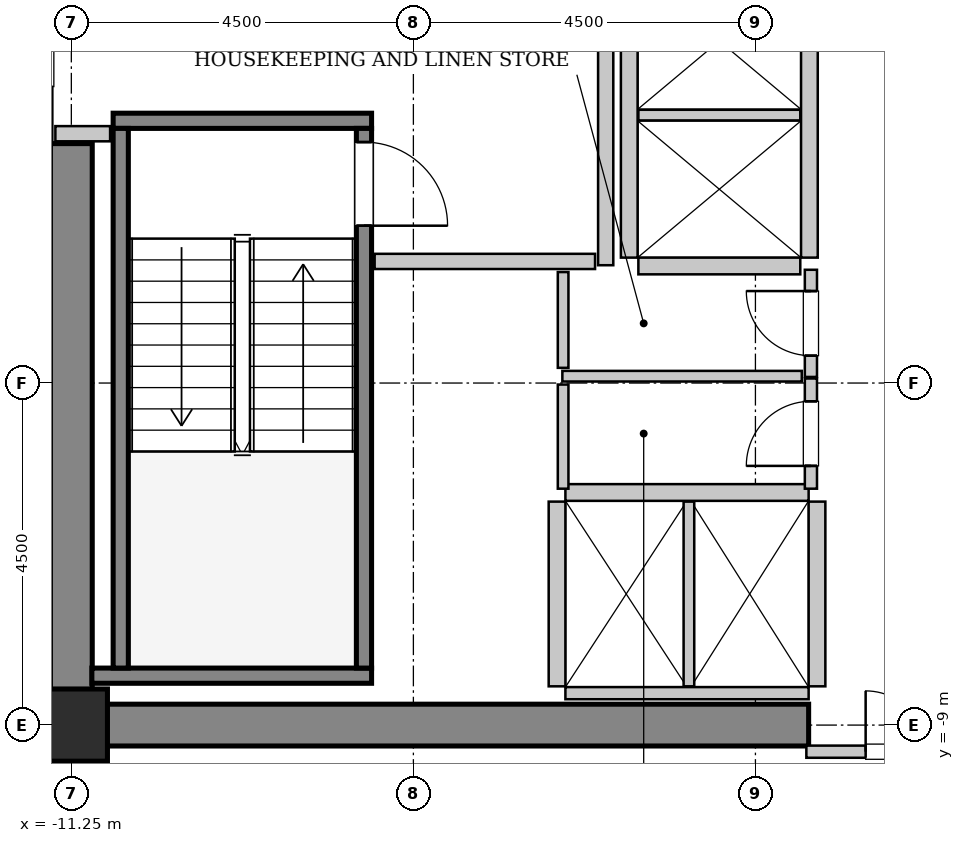
"""IFC4 building model, lengths in metres.
Left out: names, types, materials, properties, quantities, classifications, styles, units other than length and angle.
Written with IfcOpenShell. Run it as: python <this file> out.ifc"""

import sys

from ifc_helpers import new_model, si_unit, direction, frame, frame_2d, origin, origin_2d, place, context, subcontext, project, spatial, rectangle, hollow_rectangle, extrude, source, transform, mapped, element, fill, save


model = new_model("IFC4")
c1 = context("Model", 3, precision=1e-05, world=origin(), true_north=direction((0.0, 1.0)))
c2 = subcontext(c1, "Body", "Model", "MODEL_VIEW")
j1 = project(units=[si_unit("LENGTHUNIT", "METRE"), si_unit("PLANEANGLEUNIT", "RADIAN")], contexts=[c1])
p1 = place(None, origin())
s1 = spatial("IfcSite", under=j1, at=p1, CompositionType="ELEMENT")
p2 = place(p1, origin())
s2 = spatial("IfcBuilding", under=s1, at=p2, CompositionType="ELEMENT")
p3 = place(p2, frame((0.0, 0.0, 140.2)))
s3 = spatial("IfcBuildingStorey", under=s2, at=p3, CompositionType="ELEMENT", Elevation=140.2)
m1 = source(origin(), c2, "Body", "SweptSolid", [
    extrude(rectangle(XDim=9.975, YDim=0.55, at=frame_2d((4.987, 0.0))), origin(), (0.0, 0.0, 1.0), 3.8),
])
p4 = place(p3, frame((-11.525, -9.0, 0.0), z_axis=(0.0, 0.0, 1.0), x_axis=(1.0, 0.0, 0.0)))
e1 = element("IfcWall", 1, at=p4, inside=s3, PredefinedType="SHEAR", context=c2, shape_type="MappedRepresentation", body=[
    mapped(m1, transform((0.0, 0.0, 0.0), x_axis=(1.0, 0.0, 0.0), y_axis=(0.0, 1.0, 0.0), z_axis=(0.0, 0.0, 1.0), scale=1.0)),
])
m2 = source(origin(), c2, "Body", "SweptSolid", [
    extrude(rectangle(XDim=7.375, YDim=0.55, at=frame_2d((3.688, 0.0))), origin(), (0.0, 0.0, 1.0), 3.8),
])
p5 = place(p3, frame((-11.25, -8.725, 0.0), z_axis=(0.0, 0.0, 1.0), x_axis=(0.0, 1.0, 0.0)))
e2 = element("IfcWall", 2, at=p5, inside=s3, PredefinedType="SHEAR", context=c2, shape_type="MappedRepresentation", body=[
    mapped(m2, transform((0.0, 0.0, 0.0), x_axis=(1.0, 0.0, 0.0), y_axis=(0.0, 1.0, 0.0), z_axis=(0.0, 0.0, 1.0), scale=1.0)),
])
m3 = source(origin(), c2, "Body", "SweptSolid", [
    extrude(hollow_rectangle(XDim=0.95, YDim=0.95, WallThickness=0.045, InnerFilletRadius=0.045, OuterFilletRadius=0.09, at=origin_2d()), origin(), (0.0, 0.0, 1.0), 3.8),
])
p6 = place(p3, frame((-11.25, -9.0, 0.0), z_axis=(0.0, 0.0, 1.0), x_axis=(1.0, 0.0, 0.0)))
e3 = element("IfcColumn", 3, at=p6, inside=s3, PredefinedType="COLUMN", context=c2, shape_type="MappedRepresentation", body=[
    mapped(m3, transform((0.0, 0.0, 0.0), x_axis=(1.0, 0.0, 0.0), y_axis=(0.0, 1.0, 0.0), z_axis=(0.0, 0.0, 1.0), scale=1.0)),
])
m4 = source(origin(), c2, "Body", "SweptSolid", [
    extrude(rectangle(XDim=3.4, YDim=0.2, at=frame_2d((1.7, 0.0))), origin(), (0.0, 0.0, 1.0), 3.8),
])
p7 = place(p3, frame((-10.7, -1.05, 0.0), z_axis=(0.0, 0.0, 1.0), x_axis=(1.0, 0.0, 0.0)))
e4 = element("IfcWall", 4, at=p7, inside=s3, PredefinedType="SOLIDWALL", context=c2, shape_type="MappedRepresentation", body=[
    mapped(m4, transform((0.0, 0.0, 0.0), x_axis=(1.0, 0.0, 0.0), y_axis=(0.0, 1.0, 0.0), z_axis=(0.0, 0.0, 1.0), scale=1.0)),
])
m5 = source(origin(), c2, "Body", "SweptSolid", [
    extrude(rectangle(XDim=3.68, YDim=0.2, at=frame_2d((1.84, 0.0))), origin(), (0.0, 0.0, 1.0), 3.8),
])
p8 = place(p3, frame((-10.98, -8.35, 0.0), z_axis=(0.0, 0.0, 1.0), x_axis=(1.0, 0.0, 0.0)))
e5 = element("IfcWall", 5, at=p8, inside=s3, PredefinedType="SOLIDWALL", context=c2, shape_type="MappedRepresentation", body=[
    mapped(m5, transform((0.0, 0.0, 0.0), x_axis=(1.0, 0.0, 0.0), y_axis=(0.0, 1.0, 0.0), z_axis=(0.0, 0.0, 1.0), scale=1.0)),
])
m6 = source(origin(), c2, "Body", "SweptSolid", [
    extrude(rectangle(XDim=7.1, YDim=0.2, at=frame_2d((3.55, 0.0))), origin(), (0.0, 0.0, 1.0), 3.8),
])
p9 = place(p3, frame((-10.6, -1.15, 0.0), z_axis=(0.0, 0.0, 1.0), x_axis=(0.0, -1.0, 0.0)))
e6 = element("IfcWall", 6, at=p9, inside=s3, PredefinedType="SOLIDWALL", context=c2, shape_type="MappedRepresentation", body=[
    mapped(m6, transform((0.0, 0.0, 0.0), x_axis=(1.0, 0.0, 0.0), y_axis=(0.0, 1.0, 0.0), z_axis=(0.0, 0.0, 1.0), scale=1.0)),
])
p10 = place(p3, frame((-7.4, -1.15, 0.0), z_axis=(0.0, 0.0, 1.0), x_axis=(0.0, -1.0, 0.0)))
e7 = element("IfcWall", 7, at=p10, inside=s3, PredefinedType="SOLIDWALL", context=c2, shape_type="MappedRepresentation", body=[
    mapped(m6, transform((0.0, 0.0, 0.0), x_axis=(1.0, 0.0, 0.0), y_axis=(0.0, 1.0, 0.0), z_axis=(0.0, 0.0, 1.0), scale=1.0)),
])
p11 = place(p10, frame((0.18, 0.0, 0.0)))
e8 = element("IfcOpeningElement", 8, at=p11, cuts=e7, PredefinedType="OPENING", context=c2, shape_type="SweptSolid", body=[
    extrude(rectangle(XDim=1.1, YDim=2.15, at=frame_2d((0.55, 1.075))), frame((0.0, 0.11, 0.0), z_axis=(0.0, -1.0, 0.0), x_axis=(1.0, 0.0, 0.0)), (0.0, 0.0, 1.0), 0.22),
])
m7 = source(origin(), c2, "Body", "SweptSolid", [
    extrude(rectangle(XDim=3.2, YDim=0.22, at=frame_2d((1.6, 0.0))), origin(), (0.0, 0.0, 1.0), 3.485),
])
p12 = place(p3, frame((-1.55, -5.94, 0.0), z_axis=(0.0, 0.0, 1.0), x_axis=(-1.0, 0.0, 0.0)))
e9 = element("IfcWall", 9, at=p12, inside=s3, PredefinedType="SOLIDWALL", context=c2, shape_type="MappedRepresentation", body=[
    mapped(m7, transform((0.0, 0.0, 0.0), x_axis=(1.0, 0.0, 0.0), y_axis=(0.0, 1.0, 0.0), z_axis=(0.0, 0.0, 1.0), scale=1.0)),
])
m8 = source(origin(), c2, "Body", "SweptSolid", [
    extrude(rectangle(XDim=3.2, YDim=0.16, at=frame_2d((1.6, 0.0))), origin(), (0.0, 0.0, 1.0), 2.375),
])
p13 = place(p3, frame((-4.75, -8.58, 0.0), z_axis=(0.0, 0.0, 1.0), x_axis=(1.0, 0.0, 0.0)))
e10 = element("IfcWall", 10, at=p13, inside=s3, PredefinedType="PARTITIONING", context=c2, shape_type="MappedRepresentation", body=[
    mapped(m8, transform((0.0, 0.0, 0.0), x_axis=(1.0, 0.0, 0.0), y_axis=(0.0, 1.0, 0.0), z_axis=(0.0, 0.0, 1.0), scale=1.0)),
])
m9 = source(origin(), c2, "Body", "SweptSolid", [
    extrude(rectangle(XDim=2.43, YDim=0.22, at=frame_2d((1.215, 0.0))), origin(), (0.0, 0.0, 1.0), 3.485),
])
p14 = place(p3, frame((-4.86, -6.06, 0.0), z_axis=(0.0, 0.0, 1.0), x_axis=(0.0, -1.0, 0.0)))
e11 = element("IfcWall", 11, at=p14, inside=s3, PredefinedType="SOLIDWALL", context=c2, shape_type="MappedRepresentation", body=[
    mapped(m9, transform((0.0, 0.0, 0.0), x_axis=(1.0, 0.0, 0.0), y_axis=(0.0, 1.0, 0.0), z_axis=(0.0, 0.0, 1.0), scale=1.0)),
])
m10 = source(origin(), c2, "Body", "SweptSolid", [
    extrude(rectangle(XDim=2.43, YDim=0.14, at=frame_2d((1.215, 0.0))), origin(), (0.0, 0.0, 1.0), 3.485),
])
p15 = place(p3, frame((-3.125, -8.49, 0.0), z_axis=(0.0, 0.0, 1.0), x_axis=(0.0, 1.0, 0.0)))
e12 = element("IfcWall", 12, at=p15, inside=s3, PredefinedType="PARTITIONING", context=c2, shape_type="MappedRepresentation", body=[
    mapped(m10, transform((0.0, 0.0, 0.0), x_axis=(1.0, 0.0, 0.0), y_axis=(0.0, 1.0, 0.0), z_axis=(0.0, 0.0, 1.0), scale=1.0)),
])
p16 = place(p3, frame((-1.44, -8.49, 0.0), z_axis=(0.0, 0.0, 1.0), x_axis=(0.0, 1.0, 0.0)))
e13 = element("IfcWall", 13, at=p16, inside=s3, PredefinedType="SOLIDWALL", context=c2, shape_type="MappedRepresentation", body=[
    mapped(m9, transform((0.0, 0.0, 0.0), x_axis=(1.0, 0.0, 0.0), y_axis=(0.0, 1.0, 0.0), z_axis=(0.0, 0.0, 1.0), scale=1.0)),
])
m11 = source(origin(), c2, "Body", "SweptSolid", [
    extrude(rectangle(XDim=5.7, YDim=0.22, at=frame_2d((2.85, 0.0))), origin(), (0.0, 0.0, 1.0), 3.485),
])
for number, where, z_axis, x_axis in (
    (14, (-1.54, -2.85, 0.0), (0.0, 0.0, 1.0), (0.0, 1.0, 0.0)),
    (15, (-3.91, 2.85, 0.0), (0.0, 0.0, 1.0), (0.0, -1.0, 0.0)),
):
    element("IfcWall", number, at=place(p3, frame(where, z_axis=z_axis, x_axis=x_axis)), inside=s3, PredefinedType="SOLIDWALL", context=c2, shape_type="MappedRepresentation", body=[
        mapped(m11, transform((0.0, 0.0, 0.0), x_axis=(1.0, 0.0, 0.0), y_axis=(0.0, 1.0, 0.0), z_axis=(0.0, 0.0, 1.0), scale=1.0)),
    ])
m12 = source(origin(), c2, "Body", "SweptSolid", [
    extrude(rectangle(XDim=2.13, YDim=0.22, at=frame_2d((1.065, 0.0))), origin(), (0.0, 0.0, 1.0), 3.485),
])
p17 = place(p3, frame((-3.79, -2.96, 0.0), z_axis=(0.0, 0.0, 1.0), x_axis=(1.0, 0.0, 0.0)))
e16 = element("IfcWall", 16, at=p17, inside=s3, PredefinedType="SOLIDWALL", context=c2, shape_type="MappedRepresentation", body=[
    mapped(m12, transform((0.0, 0.0, 0.0), x_axis=(1.0, 0.0, 0.0), y_axis=(0.0, 1.0, 0.0), z_axis=(0.0, 0.0, 1.0), scale=1.0)),
])
m13 = source(origin(), c2, "Body", "SweptSolid", [
    extrude(rectangle(XDim=2.13, YDim=0.14, at=frame_2d((1.065, 0.0))), origin(), (0.0, 0.0, 1.0), 3.485),
])
p18 = place(p3, frame((-3.79, -0.975, 0.0), z_axis=(0.0, 0.0, 1.0), x_axis=(1.0, 0.0, 0.0)))
e17 = element("IfcWall", 17, at=p18, inside=s3, PredefinedType="PARTITIONING", context=c2, shape_type="MappedRepresentation", body=[
    mapped(m13, transform((0.0, 0.0, 0.0), x_axis=(1.0, 0.0, 0.0), y_axis=(0.0, 1.0, 0.0), z_axis=(0.0, 0.0, 1.0), scale=1.0)),
])
m14 = source(origin(), c2, "Body", "SweptSolid", [
    extrude(rectangle(XDim=5.9, YDim=0.2, at=frame_2d((2.95, 0.0))), origin(), (0.0, 0.0, 1.0), 3.485),
])
p19 = place(p3, frame((-4.22, -2.95, 0.0), z_axis=(0.0, 0.0, 1.0), x_axis=(0.0, 1.0, 0.0)))
e18 = element("IfcWall", 18, at=p19, inside=s3, PredefinedType="PARTITIONING", context=c2, shape_type="MappedRepresentation", body=[
    mapped(m14, transform((0.0, 0.0, 0.0), x_axis=(1.0, 0.0, 0.0), y_axis=(0.0, 1.0, 0.0), z_axis=(0.0, 0.0, 1.0), scale=1.0)),
])
m15 = source(origin(), c2, "Body", "SweptSolid", [
    extrude(rectangle(XDim=2.9, YDim=0.2, at=frame_2d((1.45, 0.0))), origin(), (0.0, 0.0, 1.0), 3.485),
])
p20 = place(p3, frame((-7.26, -2.9, 0.0), z_axis=(0.0, 0.0, 1.0), x_axis=(1.0, 0.0, 0.0)))
e19 = element("IfcWall", 19, at=p20, inside=s3, PredefinedType="PARTITIONING", context=c2, shape_type="MappedRepresentation", body=[
    mapped(m15, transform((0.0, 0.0, 0.0), x_axis=(1.0, 0.0, 0.0), y_axis=(0.0, 1.0, 0.0), z_axis=(0.0, 0.0, 1.0), scale=1.0)),
])
m16 = source(origin(), c2, "Body", "SweptSolid", [
    extrude(rectangle(XDim=0.72, YDim=0.2, at=frame_2d((0.36, 0.0))), origin(), (0.0, 0.0, 1.0), 3.485),
])
p21 = place(p3, frame((-11.46, -1.22, 0.0), z_axis=(0.0, 0.0, 1.0), x_axis=(1.0, 0.0, 0.0)))
e20 = element("IfcWall", 20, at=p21, inside=s3, PredefinedType="PARTITIONING", context=c2, shape_type="MappedRepresentation", body=[
    mapped(m16, transform((0.0, 0.0, 0.0), x_axis=(1.0, 0.0, 0.0), y_axis=(0.0, 1.0, 0.0), z_axis=(0.0, 0.0, 1.0), scale=1.0)),
])
m17 = source(origin(), c2, "Body", "SweptSolid", [
    extrude(rectangle(XDim=3.16, YDim=0.16, at=frame_2d((1.58, 0.0))), origin(), (0.0, 0.0, 1.0), 2.375),
])
p22 = place(p3, frame((-1.58, -9.35, 0.0), z_axis=(0.0, 0.0, 1.0), x_axis=(1.0, 0.0, 0.0)))
e21 = element("IfcWall", 21, at=p22, inside=s3, PredefinedType="PARTITIONING", context=c2, shape_type="MappedRepresentation", body=[
    mapped(m17, transform((0.0, 0.0, 0.0), x_axis=(1.0, 0.0, 0.0), y_axis=(0.0, 1.0, 0.0), z_axis=(0.0, 0.0, 1.0), scale=1.0)),
])
p23 = place(p22, frame((0.78, 0.0, 0.0)))
e22 = element("IfcOpeningElement", 22, at=p23, cuts=e21, PredefinedType="OPENING", context=c2, shape_type="SweptSolid", body=[
    extrude(rectangle(XDim=1.6, YDim=2.3, at=frame_2d((0.8, 1.15))), frame((0.0, 0.09, 0.0), z_axis=(0.0, -1.0, 0.0), x_axis=(1.0, 0.0, 0.0)), (0.0, 0.0, 1.0), 0.18),
])
m18 = source(origin(), c2, "Body", "SweptSolid", [
    extrude(rectangle(XDim=1.41, YDim=0.16, at=frame_2d((0.705, 0.0))), origin(), (0.0, 0.0, 1.0), 3.485),
])
p24 = place(p3, frame((-1.52, -4.42, 0.0), z_axis=(0.0, 0.0, 1.0), x_axis=(0.0, 1.0, 0.0)))
e23 = element("IfcWall", 23, at=p24, inside=s3, PredefinedType="PARTITIONING", context=c2, shape_type="MappedRepresentation", body=[
    mapped(m18, transform((0.0, 0.0, 0.0), x_axis=(1.0, 0.0, 0.0), y_axis=(0.0, 1.0, 0.0), z_axis=(0.0, 0.0, 1.0), scale=1.0)),
])
p25 = place(p24, frame((0.28, 0.0, 0.0)))
e24 = element("IfcOpeningElement", 24, at=p25, cuts=e23, PredefinedType="OPENING", context=c2, shape_type="SweptSolid", body=[
    extrude(rectangle(XDim=0.85, YDim=2.1, at=frame_2d((0.425, 1.05))), frame((0.0, 0.09, 0.0), z_axis=(0.0, -1.0, 0.0), x_axis=(1.0, 0.0, 0.0)), (0.0, 0.0, 1.0), 0.18),
])
m19 = source(origin(), c2, "Body", "SweptSolid", [
    extrude(rectangle(XDim=3.15, YDim=0.14, at=frame_2d((1.575, 0.0))), origin(), (0.0, 0.0, 1.0), 3.485),
])
p26 = place(p3, frame((-4.79, -4.41, 0.0), z_axis=(0.0, 0.0, 1.0), x_axis=(1.0, 0.0, 0.0)))
e25 = element("IfcWall", 25, at=p26, inside=s3, PredefinedType="PARTITIONING", context=c2, shape_type="MappedRepresentation", body=[
    mapped(m19, transform((0.0, 0.0, 0.0), x_axis=(1.0, 0.0, 0.0), y_axis=(0.0, 1.0, 0.0), z_axis=(0.0, 0.0, 1.0), scale=1.0)),
])
m20 = source(origin(), c2, "Body", "SweptSolid", [
    extrude(rectangle(XDim=1.26, YDim=0.14, at=frame_2d((0.63, 0.0))), origin(), (0.0, 0.0, 1.0), 3.485),
])
p27 = place(p3, frame((-4.78, -4.3, 0.0), z_axis=(0.0, 0.0, 1.0), x_axis=(0.0, 1.0, 0.0)))
e26 = element("IfcWall", 26, at=p27, inside=s3, PredefinedType="PARTITIONING", context=c2, shape_type="MappedRepresentation", body=[
    mapped(m20, transform((0.0, 0.0, 0.0), x_axis=(1.0, 0.0, 0.0), y_axis=(0.0, 1.0, 0.0), z_axis=(0.0, 0.0, 1.0), scale=1.0)),
])
m21 = source(origin(), c2, "Body", "SweptSolid", [
    extrude(rectangle(XDim=1.45, YDim=0.16, at=frame_2d((0.725, 0.0))), origin(), (0.0, 0.0, 1.0), 3.485),
])
p28 = place(p3, frame((-1.52, -5.89, 0.0), z_axis=(0.0, 0.0, 1.0), x_axis=(0.0, 1.0, 0.0)))
e27 = element("IfcWall", 27, at=p28, inside=s3, PredefinedType="PARTITIONING", context=c2, shape_type="MappedRepresentation", body=[
    mapped(m21, transform((0.0, 0.0, 0.0), x_axis=(1.0, 0.0, 0.0), y_axis=(0.0, 1.0, 0.0), z_axis=(0.0, 0.0, 1.0), scale=1.0)),
])
p29 = place(p28, frame((0.3, 0.0, 0.0)))
e28 = element("IfcOpeningElement", 28, at=p29, cuts=e27, PredefinedType="OPENING", context=c2, shape_type="SweptSolid", body=[
    extrude(rectangle(XDim=0.85, YDim=2.1, at=frame_2d((0.425, 1.05))), frame((0.0, 0.09, 0.0), z_axis=(0.0, -1.0, 0.0), x_axis=(1.0, 0.0, 0.0)), (0.0, 0.0, 1.0), 0.18),
])
m22 = source(origin(), c2, "Body", "SweptSolid", [
    extrude(rectangle(XDim=1.37, YDim=0.14, at=frame_2d((0.685, 0.0))), origin(), (0.0, 0.0, 1.0), 3.485),
])
p30 = place(p3, frame((-4.78, -5.89, 0.0), z_axis=(0.0, 0.0, 1.0), x_axis=(0.0, 1.0, 0.0)))
e29 = element("IfcWall", 29, at=p30, inside=s3, PredefinedType="PARTITIONING", context=c2, shape_type="MappedRepresentation", body=[
    mapped(m22, transform((0.0, 0.0, 0.0), x_axis=(1.0, 0.0, 0.0), y_axis=(0.0, 1.0, 0.0), z_axis=(0.0, 0.0, 1.0), scale=1.0)),
])
m23 = source(origin(), c2, "Body", "SweptSolid", [
    extrude(rectangle(XDim=1.1, YDim=2.15, at=frame_2d((0.55, 1.075))), frame((0.0, 0.025, 0.0), z_axis=(0.0, -1.0, 0.0), x_axis=(1.0, 0.0, 0.0)), (0.0, 0.0, 1.0), 0.05),
])
p31 = place(p11, origin())
e30 = element("IfcDoor", 30, at=p31, inside=s3, OperationType="SINGLE_SWING_RIGHT", PredefinedType="DOOR", context=c2, shape_type="MappedRepresentation", body=[
    mapped(m23, transform((0.0, 0.0, 0.0), x_axis=(1.0, 0.0, 0.0), y_axis=(0.0, 1.0, 0.0), z_axis=(0.0, 0.0, 1.0), scale=1.0)),
])
fill(e8, e30)
m24 = source(origin(), c2, "Body", "SweptSolid", [
    extrude(rectangle(XDim=1.6, YDim=2.3, at=frame_2d((0.8, 1.15))), frame((0.0, 0.025, 0.0), z_axis=(0.0, -1.0, 0.0), x_axis=(1.0, 0.0, 0.0)), (0.0, 0.0, 1.0), 0.05),
])
p32 = place(p23, origin())
e31 = element("IfcDoor", 31, at=p32, inside=s3, OperationType="DOUBLE_DOOR_SINGLE_SWING", PredefinedType="DOOR", context=c2, shape_type="MappedRepresentation", body=[
    mapped(m24, transform((0.0, 0.0, 0.0), x_axis=(1.0, 0.0, 0.0), y_axis=(0.0, 1.0, 0.0), z_axis=(0.0, 0.0, 1.0), scale=1.0)),
])
fill(e22, e31)
m25 = source(origin(), c2, "Body", "SweptSolid", [
    extrude(rectangle(XDim=0.85, YDim=2.1, at=frame_2d((0.425, 1.05))), frame((0.0, 0.025, 0.0), z_axis=(0.0, -1.0, 0.0), x_axis=(1.0, 0.0, 0.0)), (0.0, 0.0, 1.0), 0.05),
])
p33 = place(p25, origin())
e32 = element("IfcDoor", 32, at=p33, inside=s3, OperationType="SINGLE_SWING_RIGHT", PredefinedType="DOOR", context=c2, shape_type="MappedRepresentation", body=[
    mapped(m25, transform((0.0, 0.0, 0.0), x_axis=(1.0, 0.0, 0.0), y_axis=(0.0, 1.0, 0.0), z_axis=(0.0, 0.0, 1.0), scale=1.0)),
])
fill(e24, e32)
p34 = place(p29, origin())
e33 = element("IfcDoor", 33, at=p34, inside=s3, OperationType="SINGLE_SWING_LEFT", PredefinedType="DOOR", context=c2, shape_type="MappedRepresentation", body=[
    mapped(m25, transform((0.0, 0.0, 0.0), x_axis=(1.0, 0.0, 0.0), y_axis=(0.0, 1.0, 0.0), z_axis=(0.0, 0.0, 1.0), scale=1.0)),
])
fill(e28, e33)
save(model, sys.argv[1])
